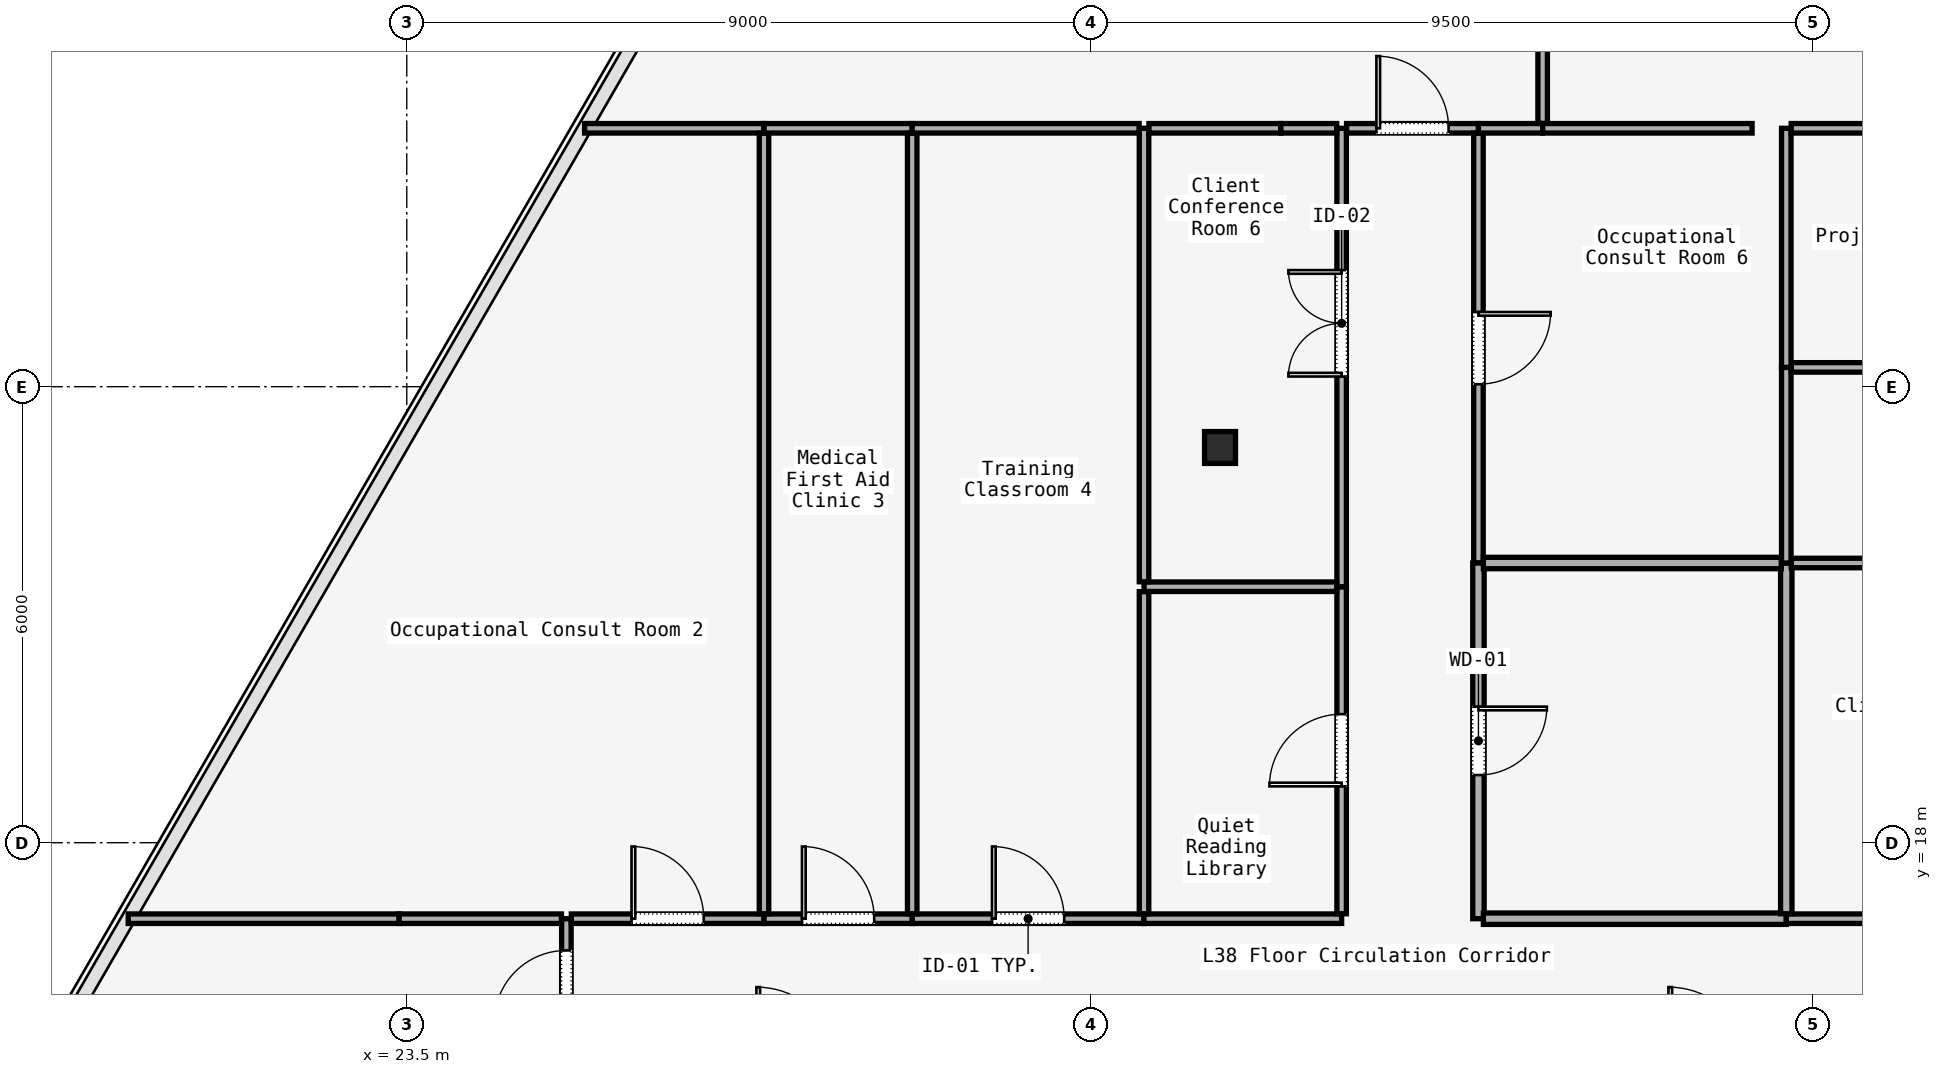
"""IFC4 building model, lengths in metres.
Left out: names, types, materials, properties, quantities, classifications, styles, units other than length and angle.
Written with IfcOpenShell. Run it as: python <this file> out.ifc"""

import sys

from ifc_helpers import new_model, si_unit, direction, frame, frame_2d, origin, origin_2d, place, context, subcontext, project, spatial, rectangle, i_section, extrude, element, fill, save


model = new_model("IFC4")
c1 = context("Model", 3, precision=1e-05, world=origin(), true_north=direction((0.0, 1.0)))
c2 = subcontext(c1, "Body", "Model", "MODEL_VIEW")
j1 = project(units=[si_unit("LENGTHUNIT", "METRE"), si_unit("PLANEANGLEUNIT", "RADIAN")], contexts=[c1])
p1 = place(None, origin())
s1 = spatial("IfcSite", under=j1, at=p1, CompositionType="ELEMENT")
p2 = place(p1, origin())
s2 = spatial("IfcBuilding", under=s1, at=p2, CompositionType="ELEMENT")
p3 = place(p2, frame((0.0, 0.0, 161.2)))
s3 = spatial("IfcBuildingStorey", under=s2, at=p3, CompositionType="ELEMENT", Elevation=161.2)
p4 = place(p3, frame((34.2, 23.2, 0.0), z_axis=(0.0, 0.0, 1.0), x_axis=(1.0, 0.0, 0.0)))
e1 = element("IfcColumn", 1, at=p4, inside=s3, PredefinedType="COLUMN", context=c2, shape_type="SweptSolid", body=[
    extrude(i_section(OverallWidth=0.407, OverallDepth=0.419, WebThickness=0.031, FlangeThickness=0.049, FilletRadius=0.015, at=origin_2d()), origin(), (0.0, 0.0, 1.0), 3.58),
])
p5 = place(p3, frame((25.6, 15.215, 0.0), z_axis=(0.0, 0.0, 1.0), x_axis=(0.0, 1.0, 0.0)))
e2 = element("IfcWall", 2, at=p5, inside=s3, PredefinedType="PARTITIONING", context=c2, shape_type="SweptSolid", body=[
    extrude(rectangle(XDim=1.785, YDim=0.125, at=frame_2d((0.893, 0.0))), origin(), (0.0, 0.0, 1.0), 3.01),
])
p6 = place(p5, frame((0.417, 0.0, 0.0)))
e3 = element("IfcOpeningElement", 3, at=p6, cuts=e2, PredefinedType="OPENING", context=c2, shape_type="SweptSolid", body=[
    extrude(rectangle(XDim=0.95, YDim=2.2, at=frame_2d((0.475, 1.1))), frame((0.0, 0.062, 0.0), z_axis=(0.0, -1.0, 0.0), x_axis=(1.0, 0.0, 0.0)), (0.0, 0.0, 1.0), 0.125),
])
p7 = place(p3, frame((25.665, 17.0, 0.0), z_axis=(0.0, 0.0, 1.0), x_axis=(1.0, 0.0, 0.0)))
e4 = element("IfcWall", 4, at=p7, inside=s3, PredefinedType="PARTITIONING", context=c2, shape_type="SweptSolid", body=[
    extrude(rectangle(XDim=2.535, YDim=0.125, at=frame_2d((1.268, 0.0))), origin(), (0.0, 0.0, 1.0), 3.01),
])
p8 = place(p7, frame((0.792, 0.0, 0.0)))
e5 = element("IfcOpeningElement", 5, at=p8, cuts=e4, PredefinedType="OPENING", context=c2, shape_type="SweptSolid", body=[
    extrude(rectangle(XDim=0.95, YDim=2.2, at=frame_2d((0.475, 1.1))), frame((0.0, 0.062, 0.0), z_axis=(0.0, -1.0, 0.0), x_axis=(1.0, 0.0, 0.0)), (0.0, 0.0, 1.0), 0.125),
])
p9 = place(p3, frame((28.2, 17.0, 0.0), z_axis=(0.0, 0.0, 1.0), x_axis=(1.0, 0.0, 0.0)))
e6 = element("IfcWall", 6, at=p9, inside=s3, PredefinedType="PARTITIONING", context=c2, shape_type="SweptSolid", body=[
    extrude(rectangle(XDim=1.95, YDim=0.125, at=frame_2d((0.975, 0.0))), origin(), (0.0, 0.0, 1.0), 3.01),
])
p10 = place(p9, frame((0.5, 0.0, 0.0)))
e7 = element("IfcOpeningElement", 7, at=p10, cuts=e6, PredefinedType="OPENING", context=c2, shape_type="SweptSolid", body=[
    extrude(rectangle(XDim=0.95, YDim=2.2, at=frame_2d((0.475, 1.1))), frame((0.0, 0.062, 0.0), z_axis=(0.0, -1.0, 0.0), x_axis=(1.0, 0.0, 0.0)), (0.0, 0.0, 1.0), 0.125),
])
p11 = place(p3, frame((30.15, 17.0, 0.0), z_axis=(0.0, 0.0, 1.0), x_axis=(1.0, 0.0, 0.0)))
e8 = element("IfcWall", 8, at=p11, inside=s3, PredefinedType="PARTITIONING", context=c2, shape_type="SweptSolid", body=[
    extrude(rectangle(XDim=3.05, YDim=0.125, at=frame_2d((1.525, 0.0))), origin(), (0.0, 0.0, 1.0), 3.01),
])
p12 = place(p11, frame((1.05, 0.0, 0.0)))
e9 = element("IfcOpeningElement", 9, at=p12, cuts=e8, PredefinedType="OPENING", context=c2, shape_type="SweptSolid", body=[
    extrude(rectangle(XDim=0.95, YDim=2.2, at=frame_2d((0.475, 1.1))), frame((0.0, 0.062, 0.0), z_axis=(0.0, -1.0, 0.0), x_axis=(1.0, 0.0, 0.0)), (0.0, 0.0, 1.0), 0.125),
])
p13 = place(p3, frame((33.2, 17.0, 0.0), z_axis=(0.0, 0.0, 1.0), x_axis=(1.0, 0.0, 0.0)))
e10 = element("IfcWall", 10, at=p13, inside=s3, PredefinedType="PARTITIONING", context=c2, shape_type="SweptSolid", body=[
    extrude(rectangle(XDim=2.6, YDim=0.125, at=frame_2d((1.3, 0.0))), origin(), (0.0, 0.0, 1.0), 3.01),
])
p14 = place(p3, frame((35.8, 17.065, 0.0), z_axis=(0.0, 0.0, 1.0), x_axis=(0.0, 1.0, 0.0)))
e11 = element("IfcWall", 11, at=p14, inside=s3, PredefinedType="PARTITIONING", context=c2, shape_type="SweptSolid", body=[
    extrude(rectangle(XDim=4.303, YDim=0.125, at=frame_2d((2.151, 0.0))), origin(), (0.0, 0.0, 1.0), 3.01),
])
p15 = place(p14, frame((1.677, 0.0, 0.0)))
e12 = element("IfcOpeningElement", 12, at=p15, cuts=e11, PredefinedType="OPENING", context=c2, shape_type="SweptSolid", body=[
    extrude(rectangle(XDim=0.95, YDim=2.2, at=frame_2d((0.475, 1.1))), frame((0.0, 0.062, 0.0), z_axis=(0.0, -1.0, 0.0), x_axis=(1.0, 0.0, 0.0)), (0.0, 0.0, 1.0), 0.125),
])
p16 = place(p3, frame((35.8, 21.368, 0.0), z_axis=(0.0, 0.0, 1.0), x_axis=(0.0, 1.0, 0.0)))
e13 = element("IfcWall", 13, at=p16, inside=s3, PredefinedType="PARTITIONING", context=c2, shape_type="SweptSolid", body=[
    extrude(rectangle(XDim=6.032, YDim=0.125, at=frame_2d((3.016, 0.0))), origin(), (0.0, 0.0, 1.0), 3.01),
])
p17 = place(p16, frame((2.766, 0.0, 0.0)))
e14 = element("IfcOpeningElement", 14, at=p17, cuts=e13, PredefinedType="OPENING", context=c2, shape_type="SweptSolid", body=[
    extrude(rectangle(XDim=1.4, YDim=2.2, at=frame_2d((0.7, 1.1))), frame((0.0, 0.062, 0.0), z_axis=(0.0, -1.0, 0.0), x_axis=(1.0, 0.0, 0.0)), (0.0, 0.0, 1.0), 0.125),
])
p18 = place(p3, frame((35.865, 27.4, 0.0), z_axis=(0.0, 0.0, 1.0), x_axis=(1.0, 0.0, 0.0)))
e15 = element("IfcWall", 15, at=p18, inside=s3, PredefinedType="PARTITIONING", context=c2, shape_type="SweptSolid", body=[
    extrude(rectangle(XDim=1.735, YDim=0.125, at=frame_2d((0.868, 0.0))), origin(), (0.0, 0.0, 1.0), 3.01),
])
p19 = place(p18, frame((0.393, 0.0, 0.0)))
e16 = element("IfcOpeningElement", 16, at=p19, cuts=e15, PredefinedType="OPENING", context=c2, shape_type="SweptSolid", body=[
    extrude(rectangle(XDim=0.95, YDim=2.2, at=frame_2d((0.475, 1.1))), frame((0.0, 0.062, 0.0), z_axis=(0.0, -1.0, 0.0), x_axis=(1.0, 0.0, 0.0)), (0.0, 0.0, 1.0), 0.125),
])
p20 = place(p3, frame((37.6, 27.335, 0.0), z_axis=(0.0, 0.0, 1.0), x_axis=(0.0, -1.0, 0.0)))
e17 = element("IfcWall", 17, at=p20, inside=s3, PredefinedType="PARTITIONING", context=c2, shape_type="SweptSolid", body=[
    extrude(rectangle(XDim=5.655, YDim=0.125, at=frame_2d((2.828, 0.0))), origin(), (0.0, 0.0, 1.0), 3.01),
])
p21 = place(p20, frame((2.353, 0.0, 0.0)))
e18 = element("IfcOpeningElement", 18, at=p21, cuts=e17, PredefinedType="OPENING", context=c2, shape_type="SweptSolid", body=[
    extrude(rectangle(XDim=0.95, YDim=2.2, at=frame_2d((0.475, 1.1))), frame((0.0, 0.062, 0.0), z_axis=(0.0, -1.0, 0.0), x_axis=(1.0, 0.0, 0.0)), (0.0, 0.0, 1.0), 0.125),
])
p22 = place(p3, frame((37.6, 21.68, 0.0), z_axis=(0.0, 0.0, 1.0), x_axis=(0.0, -1.0, 0.0)))
e19 = element("IfcWall", 19, at=p22, inside=s3, PredefinedType="PARTITIONING", context=c2, shape_type="SweptSolid", body=[
    extrude(rectangle(XDim=4.68, YDim=0.15, at=frame_2d((2.34, 0.0))), origin(), (0.0, 0.0, 1.0), 3.01),
])
p23 = place(p22, frame((1.89, 0.0, 0.0)))
e20 = element("IfcOpeningElement", 20, at=p23, cuts=e19, PredefinedType="OPENING", context=c2, shape_type="SweptSolid", body=[
    extrude(rectangle(XDim=0.9, YDim=2.15, at=frame_2d((0.45, 1.075))), frame((0.0, 0.075, 0.0), z_axis=(0.0, -1.0, 0.0), x_axis=(1.0, 0.0, 0.0)), (0.0, 0.0, 1.0), 0.15),
])
p24 = place(p3, frame((37.665, 17.0, 0.0), z_axis=(0.0, 0.0, 1.0), x_axis=(1.0, 0.0, 0.0)))
e21 = element("IfcWall", 21, at=p24, inside=s3, PredefinedType="PARTITIONING", context=c2, shape_type="SweptSolid", body=[
    extrude(rectangle(XDim=3.985, YDim=0.15, at=frame_2d((1.992, 0.0))), origin(), (0.0, 0.0, 1.0), 3.01),
])
p25 = place(p3, frame((41.65, 17.0, 0.0), z_axis=(0.0, 0.0, 1.0), x_axis=(1.0, 0.0, 0.0)))
e22 = element("IfcWall", 22, at=p25, inside=s3, PredefinedType="PARTITIONING", context=c2, shape_type="SweptSolid", body=[
    extrude(rectangle(XDim=4.95, YDim=0.125, at=frame_2d((2.475, 0.0))), origin(), (0.0, 0.0, 1.0), 3.01),
])
p26 = place(p25, frame((1.775, 0.0, 0.0)))
e23 = element("IfcOpeningElement", 23, at=p26, cuts=e22, PredefinedType="OPENING", context=c2, shape_type="SweptSolid", body=[
    extrude(rectangle(XDim=1.4, YDim=2.2, at=frame_2d((0.7, 1.1))), frame((0.0, 0.062, 0.0), z_axis=(0.0, -1.0, 0.0), x_axis=(1.0, 0.0, 0.0)), (0.0, 0.0, 1.0), 0.125),
])
p27 = place(p3, frame((19.835, 17.0, 0.0), z_axis=(0.0, 0.0, 1.0), x_axis=(1.0, 0.0, 0.0)))
e24 = element("IfcWall", 24, at=p27, inside=s3, PredefinedType="PARTITIONING", context=c2, shape_type="SweptSolid", body=[
    extrude(rectangle(XDim=3.564, YDim=0.125, at=frame_2d((1.782, 0.0))), origin(), (0.0, 0.0, 1.0), 3.01),
])
p28 = place(p3, frame((23.4, 17.0, 0.0), z_axis=(0.0, 0.0, 1.0), x_axis=(1.0, 0.0, 0.0)))
e25 = element("IfcWall", 25, at=p28, inside=s3, PredefinedType="PARTITIONING", context=c2, shape_type="SweptSolid", body=[
    extrude(rectangle(XDim=2.135, YDim=0.125, at=frame_2d((1.067, 0.0))), origin(), (0.0, 0.0, 1.0), 3.01),
])
p29 = place(p3, frame((33.2, 21.368, 0.0), z_axis=(0.0, 0.0, 1.0), x_axis=(1.0, 0.0, 0.0)))
e26 = element("IfcWall", 26, at=p29, inside=s3, PredefinedType="PARTITIONING", context=c2, shape_type="SweptSolid", body=[
    extrude(rectangle(XDim=2.535, YDim=0.125, at=frame_2d((1.268, 0.0))), origin(), (0.0, 0.0, 1.0), 3.01),
])
p30 = place(p3, frame((33.2, 17.065, 0.0), z_axis=(0.0, 0.0, 1.0), x_axis=(0.0, 1.0, 0.0)))
e27 = element("IfcWall", 27, at=p30, inside=s3, PredefinedType="PARTITIONING", context=c2, shape_type="SweptSolid", body=[
    extrude(rectangle(XDim=4.238, YDim=0.125, at=frame_2d((2.119, 0.0))), origin(), (0.0, 0.0, 1.0), 3.01),
])
p31 = place(p3, frame((41.65, 21.68, 0.0), z_axis=(0.0, 0.0, 1.0), x_axis=(0.0, -1.0, 0.0)))
e28 = element("IfcWall", 28, at=p31, inside=s3, PredefinedType="PARTITIONING", context=c2, shape_type="SweptSolid", body=[
    extrude(rectangle(XDim=4.615, YDim=0.15, at=frame_2d((2.308, 0.0))), origin(), (0.0, 0.0, 1.0), 3.01),
])
p32 = place(p3, frame((37.665, 21.68, 0.0), z_axis=(0.0, 0.0, 1.0), x_axis=(1.0, 0.0, 0.0)))
e29 = element("IfcWall", 29, at=p32, inside=s3, PredefinedType="PARTITIONING", context=c2, shape_type="SweptSolid", body=[
    extrude(rectangle(XDim=3.92, YDim=0.15, at=frame_2d((1.96, 0.0))), origin(), (0.0, 0.0, 1.0), 3.01),
])
p33 = place(p3, frame((41.715, 21.68, 0.0), z_axis=(0.0, 0.0, 1.0), x_axis=(1.0, 0.0, 0.0)))
e30 = element("IfcWall", 30, at=p33, inside=s3, PredefinedType="PARTITIONING", context=c2, shape_type="SweptSolid", body=[
    extrude(rectangle(XDim=4.82, YDim=0.125, at=frame_2d((2.41, 0.0))), origin(), (0.0, 0.0, 1.0), 3.01),
])
p34 = place(p3, frame((25.84, 27.4, 0.0), z_axis=(0.0, 0.0, 1.0), x_axis=(1.0, 0.0, 0.0)))
e31 = element("IfcWall", 31, at=p34, inside=s3, PredefinedType="PARTITIONING", context=c2, shape_type="SweptSolid", body=[
    extrude(rectangle(XDim=2.36, YDim=0.125, at=frame_2d((1.18, 0.0))), origin(), (0.0, 0.0, 1.0), 3.01),
])
p35 = place(p3, frame((28.2, 27.335, 0.0), z_axis=(0.0, 0.0, 1.0), x_axis=(0.0, -1.0, 0.0)))
e32 = element("IfcWall", 32, at=p35, inside=s3, PredefinedType="PARTITIONING", context=c2, shape_type="SweptSolid", body=[
    extrude(rectangle(XDim=10.27, YDim=0.125, at=frame_2d((5.135, 0.0))), origin(), (0.0, 0.0, 1.0), 3.01),
])
p36 = place(p3, frame((28.2, 27.4, 0.0), z_axis=(0.0, 0.0, 1.0), x_axis=(1.0, 0.0, 0.0)))
e33 = element("IfcWall", 33, at=p36, inside=s3, PredefinedType="PARTITIONING", context=c2, shape_type="SweptSolid", body=[
    extrude(rectangle(XDim=1.95, YDim=0.125, at=frame_2d((0.975, 0.0))), origin(), (0.0, 0.0, 1.0), 3.01),
])
p37 = place(p3, frame((30.15, 27.335, 0.0), z_axis=(0.0, 0.0, 1.0), x_axis=(0.0, -1.0, 0.0)))
e34 = element("IfcWall", 34, at=p37, inside=s3, PredefinedType="PARTITIONING", context=c2, shape_type="SweptSolid", body=[
    extrude(rectangle(XDim=10.27, YDim=0.125, at=frame_2d((5.135, 0.0))), origin(), (0.0, 0.0, 1.0), 3.01),
])
p38 = place(p3, frame((33.2, 27.4, 0.0), z_axis=(0.0, 0.0, 1.0), x_axis=(0.0, -1.0, 0.0)))
e35 = element("IfcWall", 35, at=p38, inside=s3, PredefinedType="PARTITIONING", context=c2, shape_type="SweptSolid", body=[
    extrude(rectangle(XDim=5.967, YDim=0.125, at=frame_2d((2.983, 0.0))), origin(), (0.0, 0.0, 1.0), 3.01),
])
p39 = place(p3, frame((30.15, 27.4, 0.0), z_axis=(0.0, 0.0, 1.0), x_axis=(1.0, 0.0, 0.0)))
e36 = element("IfcWall", 36, at=p39, inside=s3, PredefinedType="PARTITIONING", context=c2, shape_type="SweptSolid", body=[
    extrude(rectangle(XDim=2.985, YDim=0.125, at=frame_2d((1.493, 0.0))), origin(), (0.0, 0.0, 1.0), 3.01),
])
p40 = place(p3, frame((41.65, 21.68, 0.0), z_axis=(0.0, 0.0, 1.0), x_axis=(0.0, 1.0, 0.0)))
e37 = element("IfcWall", 37, at=p40, inside=s3, PredefinedType="PARTITIONING", context=c2, shape_type="SweptSolid", body=[
    extrude(rectangle(XDim=2.574, YDim=0.125, at=frame_2d((1.287, 0.0))), origin(), (0.0, 0.0, 1.0), 3.01),
])
p41 = place(p3, frame((41.715, 24.254, 0.0), z_axis=(0.0, 0.0, 1.0), x_axis=(1.0, 0.0, 0.0)))
e38 = element("IfcWall", 38, at=p41, inside=s3, PredefinedType="PARTITIONING", context=c2, shape_type="SweptSolid", body=[
    extrude(rectangle(XDim=4.82, YDim=0.125, at=frame_2d((2.41, 0.0))), origin(), (0.0, 0.0, 1.0), 3.01),
])
p42 = place(p3, frame((33.265, 27.4, 0.0), z_axis=(0.0, 0.0, 1.0), x_axis=(1.0, 0.0, 0.0)))
e39 = element("IfcWall", 39, at=p42, inside=s3, PredefinedType="PARTITIONING", context=c2, shape_type="SweptSolid", body=[
    extrude(rectangle(XDim=1.735, YDim=0.125, at=frame_2d((0.868, 0.0))), origin(), (0.0, 0.0, 1.0), 3.01),
])
p43 = place(p3, frame((35.0, 27.4, 0.0), z_axis=(0.0, 0.0, 1.0), x_axis=(1.0, 0.0, 0.0)))
e40 = element("IfcWall", 40, at=p43, inside=s3, PredefinedType="PARTITIONING", context=c2, shape_type="SweptSolid", body=[
    extrude(rectangle(XDim=0.735, YDim=0.125, at=frame_2d((0.368, 0.0))), origin(), (0.0, 0.0, 1.0), 3.01),
])
p44 = place(p3, frame((41.65, 27.4, 0.0), z_axis=(0.0, 0.0, 1.0), x_axis=(0.0, -1.0, 0.0)))
e41 = element("IfcWall", 41, at=p44, inside=s3, PredefinedType="PARTITIONING", context=c2, shape_type="SweptSolid", body=[
    extrude(rectangle(XDim=3.146, YDim=0.125, at=frame_2d((1.573, 0.0))), origin(), (0.0, 0.0, 1.0), 3.01),
])
p45 = place(p3, frame((37.6, 27.4, 0.0), z_axis=(0.0, 0.0, 1.0), x_axis=(1.0, 0.0, 0.0)))
e42 = element("IfcWall", 42, at=p45, inside=s3, PredefinedType="PARTITIONING", context=c2, shape_type="SweptSolid", body=[
    extrude(rectangle(XDim=0.845, YDim=0.125, at=frame_2d((0.422, 0.0))), origin(), (0.0, 0.0, 1.0), 3.01),
])
p46 = place(p3, frame((38.445, 27.4, 0.0), z_axis=(0.0, 0.0, 1.0), x_axis=(1.0, 0.0, 0.0)))
e43 = element("IfcWall", 43, at=p46, inside=s3, PredefinedType="PARTITIONING", context=c2, shape_type="SweptSolid", body=[
    extrude(rectangle(XDim=2.755, YDim=0.125, at=frame_2d((1.377, 0.0))), origin(), (0.0, 0.0, 1.0), 3.01),
])
p47 = place(p3, frame((41.715, 27.4, 0.0), z_axis=(0.0, 0.0, 1.0), x_axis=(1.0, 0.0, 0.0)))
e44 = element("IfcWall", 44, at=p47, inside=s3, PredefinedType="PARTITIONING", context=c2, shape_type="SweptSolid", body=[
    extrude(rectangle(XDim=4.82, YDim=0.125, at=frame_2d((2.41, 0.0))), origin(), (0.0, 0.0, 1.0), 3.01),
])
p48 = place(p3, frame((38.445, 46.202, 0.0), z_axis=(0.0, 0.0, 1.0), x_axis=(0.0, -1.0, 0.0)))
e45 = element("IfcWall", 45, at=p48, inside=s3, PredefinedType="PARTITIONING", context=c2, shape_type="SweptSolid", body=[
    extrude(rectangle(XDim=18.737, YDim=0.125, at=frame_2d((9.368, 0.0))), origin(), (0.0, 0.0, 1.0), 3.01),
])
p49 = place(p6, origin())
e46 = element("IfcDoor", 46, at=p49, inside=s3, OperationType="SINGLE_SWING_LEFT", PredefinedType="DOOR", context=c2, shape_type="SweptSolid", body=[
    extrude(rectangle(XDim=0.95, YDim=2.2, at=frame_2d((0.475, 1.1))), frame((0.0, 0.025, 0.0), z_axis=(0.0, -1.0, 0.0), x_axis=(1.0, 0.0, 0.0)), (0.0, 0.0, 1.0), 0.05),
])
fill(e3, e46)
p50 = place(p15, origin())
e47 = element("IfcDoor", 47, at=p50, inside=s3, OperationType="SINGLE_SWING_RIGHT", PredefinedType="DOOR", context=c2, shape_type="SweptSolid", body=[
    extrude(rectangle(XDim=0.95, YDim=2.2, at=frame_2d((0.475, 1.1))), frame((0.0, 0.025, 0.0), z_axis=(0.0, -1.0, 0.0), x_axis=(1.0, 0.0, 0.0)), (0.0, 0.0, 1.0), 0.05),
])
fill(e12, e47)
p51 = place(p23, origin())
e48 = element("IfcDoor", 48, at=p51, inside=s3, OperationType="SINGLE_SWING_LEFT", PredefinedType="DOOR", context=c2, shape_type="SweptSolid", body=[
    extrude(rectangle(XDim=0.9, YDim=2.15, at=frame_2d((0.45, 1.075))), frame((0.0, 0.025, 0.0), z_axis=(0.0, -1.0, 0.0), x_axis=(1.0, 0.0, 0.0)), (0.0, 0.0, 1.0), 0.05),
])
fill(e20, e48)
p52 = place(p8, origin())
e49 = element("IfcDoor", 49, at=p52, inside=s3, OperationType="SINGLE_SWING_RIGHT", PredefinedType="DOOR", context=c2, shape_type="SweptSolid", body=[
    extrude(rectangle(XDim=0.95, YDim=2.2, at=frame_2d((0.475, 1.1))), frame((0.0, 0.025, 0.0), z_axis=(0.0, -1.0, 0.0), x_axis=(1.0, 0.0, 0.0)), (0.0, 0.0, 1.0), 0.05),
])
fill(e5, e49)
p53 = place(p10, origin())
e50 = element("IfcDoor", 50, at=p53, inside=s3, OperationType="SINGLE_SWING_LEFT", PredefinedType="DOOR", context=c2, shape_type="SweptSolid", body=[
    extrude(rectangle(XDim=0.95, YDim=2.2, at=frame_2d((0.475, 1.1))), frame((0.0, 0.025, 0.0), z_axis=(0.0, -1.0, 0.0), x_axis=(1.0, 0.0, 0.0)), (0.0, 0.0, 1.0), 0.05),
])
fill(e7, e50)
p54 = place(p12, origin())
e51 = element("IfcDoor", 51, at=p54, inside=s3, OperationType="SINGLE_SWING_RIGHT", PredefinedType="DOOR", context=c2, shape_type="SweptSolid", body=[
    extrude(rectangle(XDim=0.95, YDim=2.2, at=frame_2d((0.475, 1.1))), frame((0.0, 0.025, 0.0), z_axis=(0.0, -1.0, 0.0), x_axis=(1.0, 0.0, 0.0)), (0.0, 0.0, 1.0), 0.05),
])
fill(e9, e51)
p55 = place(p17, origin())
e52 = element("IfcDoor", 52, at=p55, inside=s3, OperationType="SINGLE_SWING_LEFT", PredefinedType="DOOR", context=c2, shape_type="SweptSolid", body=[
    extrude(rectangle(XDim=1.4, YDim=2.2, at=frame_2d((0.7, 1.1))), frame((0.0, 0.025, 0.0), z_axis=(0.0, -1.0, 0.0), x_axis=(1.0, 0.0, 0.0)), (0.0, 0.0, 1.0), 0.05),
])
fill(e14, e52)
p56 = place(p21, origin())
e53 = element("IfcDoor", 53, at=p56, inside=s3, OperationType="SINGLE_SWING_RIGHT", PredefinedType="DOOR", context=c2, shape_type="SweptSolid", body=[
    extrude(rectangle(XDim=0.95, YDim=2.2, at=frame_2d((0.475, 1.1))), frame((0.0, 0.025, 0.0), z_axis=(0.0, -1.0, 0.0), x_axis=(1.0, 0.0, 0.0)), (0.0, 0.0, 1.0), 0.05),
])
fill(e18, e53)
p57 = place(p19, origin())
e54 = element("IfcDoor", 54, at=p57, inside=s3, OperationType="SINGLE_SWING_RIGHT", PredefinedType="DOOR", context=c2, shape_type="SweptSolid", body=[
    extrude(rectangle(XDim=0.95, YDim=2.2, at=frame_2d((0.475, 1.1))), frame((0.0, 0.025, 0.0), z_axis=(0.0, -1.0, 0.0), x_axis=(1.0, 0.0, 0.0)), (0.0, 0.0, 1.0), 0.05),
])
fill(e16, e54)
save(model, sys.argv[1])
